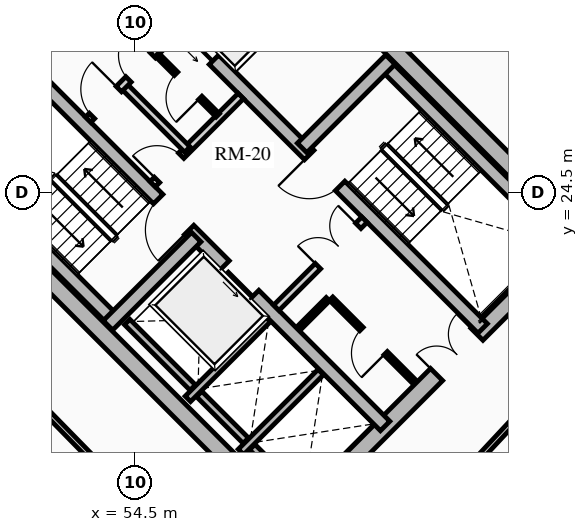
"""IFC4 building model, lengths in metres.
Left out: names, types, materials, properties, quantities, classifications, styles, units other than length and angle.
Written with IfcOpenShell. Run it as: python <this file> out.ifc"""

import sys

from ifc_helpers import new_model, si_unit, direction, frame, frame_2d, origin, place, context, subcontext, project, spatial, rectangle, extrude, source, transform, mapped, element, fill, save


model = new_model("IFC4")
c1 = context("Model", 3, precision=1e-05, world=origin(), true_north=direction((0.0, 1.0)))
c2 = subcontext(c1, "Body", "Model", "MODEL_VIEW")
j1 = project(units=[si_unit("LENGTHUNIT", "METRE"), si_unit("PLANEANGLEUNIT", "RADIAN")], contexts=[c1])
p1 = place(None, origin())
s1 = spatial("IfcSite", under=j1, at=p1, CompositionType="ELEMENT")
p2 = place(p1, origin())
s2 = spatial("IfcBuilding", under=s1, at=p2, CompositionType="ELEMENT")
p3 = place(p2, frame((0.0, 0.0, 87.61)))
s3 = spatial("IfcBuildingStorey", under=s2, at=p3, CompositionType="ELEMENT", Elevation=87.61)
for number, where, z_axis, x_axis in (
    (1, (58.737, 15.697, 0.0), (0.0, 0.0, 1.0), (-0.707, 0.707, 0.0)),
    (2, (66.303, 23.263, 0.0), (0.0, 0.0, 1.0), (-0.707, 0.707, 0.0)),
):
    element("IfcWall", number, at=place(p3, frame(where, z_axis=z_axis, x_axis=x_axis)), inside=s3, PredefinedType="SHEAR", context=c2, shape_type="SweptSolid", body=[
        extrude(rectangle(XDim=14.2, YDim=0.45, at=frame_2d((7.1, 0.0))), origin(), (0.0, 0.0, 1.0), 2.91),
    ])
p4 = place(p3, frame((58.578, 15.856, 0.0), z_axis=(0.0, 0.0, 1.0), x_axis=(0.707106781187, 0.707106781187, 0.0)))
e3 = element("IfcWall", 3, at=p4, inside=s3, PredefinedType="SHEAR", context=c2, shape_type="SweptSolid", body=[
    extrude(rectangle(XDim=10.7, YDim=0.45, at=frame_2d((5.35, 0.0))), origin(), (0.0, 0.0, 1.0), 2.91),
])
m1 = source(origin(), c2, "Body", "SweptSolid", [
    extrude(rectangle(XDim=1.5, YDim=2.02, at=frame_2d((0.75, 1.01))), frame((0.0, 0.235, 0.0), z_axis=(0.0, -1.0, 0.0), x_axis=(1.0, 0.0, 0.0)), (0.0, 0.0, 1.0), 0.47),
])
p5 = place(p4, frame((5.45, 0.0, 0.0)))
e4 = element("IfcOpeningElement", 4, at=p5, cuts=e3, PredefinedType="OPENING", context=c2, shape_type="MappedRepresentation", body=[
    mapped(m1, transform((0.0, 0.0, 0.0), x_axis=(1.0, 0.0, 0.0), y_axis=(0.0, 1.0, 0.0), z_axis=(0.0, 0.0, 1.0), scale=1.0)),
])
p6 = place(p3, frame((48.856, 25.578, 0.0), z_axis=(0.0, 0.0, 1.0), x_axis=(0.707106781187, 0.707106781187, 0.0)))
e5 = element("IfcWall", 5, at=p6, inside=s3, PredefinedType="SHEAR", context=c2, shape_type="SweptSolid", body=[
    extrude(rectangle(XDim=10.7, YDim=0.45, at=frame_2d((5.35, 0.0))), origin(), (0.0, 0.0, 1.0), 2.91),
])
p7 = place(p6, frame((4.6, 0.0, 0.0)))
e6 = element("IfcOpeningElement", 6, at=p7, cuts=e5, PredefinedType="OPENING", context=c2, shape_type="MappedRepresentation", body=[
    mapped(m1, transform((0.0, 0.0, 0.0), x_axis=(1.0, 0.0, 0.0), y_axis=(0.0, 1.0, 0.0), z_axis=(0.0, 0.0, 1.0), scale=1.0)),
])
p8 = place(p3, frame((61.078, 18.355, 0.0), z_axis=(0.0, 0.0, 1.0), x_axis=(-0.707106781187, 0.707106781187, 0.0)))
e7 = element("IfcWall", 7, at=p8, inside=s3, PredefinedType="SHEAR", context=c2, shape_type="SweptSolid", body=[
    extrude(rectangle(XDim=13.75, YDim=0.35, at=frame_2d((6.875, 0.0))), origin(), (0.0, 0.0, 1.0), 2.91),
])
m2 = source(origin(), c2, "Body", "SweptSolid", [
    extrude(rectangle(XDim=1.1, YDim=2.015, at=frame_2d((0.55, 1.007))), frame((0.0, 0.185, 0.0), z_axis=(0.0, -1.0, 0.0), x_axis=(1.0, 0.0, 0.0)), (0.0, 0.0, 1.0), 0.37),
])
p9 = place(p8, frame((4.875, 0.0, 0.0)))
e8 = element("IfcOpeningElement", 8, at=p9, cuts=e7, PredefinedType="OPENING", context=c2, shape_type="MappedRepresentation", body=[
    mapped(m2, transform((0.0, 0.0, 0.0), x_axis=(1.0, 0.0, 0.0), y_axis=(0.0, 1.0, 0.0), z_axis=(0.0, 0.0, 1.0), scale=1.0)),
])
m3 = source(origin(), c2, "Body", "SweptSolid", [
    extrude(rectangle(XDim=1.15, YDim=2.02, at=frame_2d((0.575, 1.01))), frame((0.0, 0.185, 0.0), z_axis=(0.0, -1.0, 0.0), x_axis=(1.0, 0.0, 0.0)), (0.0, 0.0, 1.0), 0.37),
])
p10 = place(p8, frame((7.295, 0.0, 0.0)))
e9 = element("IfcOpeningElement", 9, at=p10, cuts=e7, PredefinedType="OPENING", context=c2, shape_type="MappedRepresentation", body=[
    mapped(m3, transform((0.0, 0.0, 0.0), x_axis=(1.0, 0.0, 0.0), y_axis=(0.0, 1.0, 0.0), z_axis=(0.0, 0.0, 1.0), scale=1.0)),
])
p11 = place(p3, frame((63.645, 20.922, 0.0), z_axis=(0.0, 0.0, 1.0), x_axis=(-0.707106781187, 0.707106781187, 0.0)))
e10 = element("IfcWall", 10, at=p11, inside=s3, PredefinedType="SHEAR", context=c2, shape_type="SweptSolid", body=[
    extrude(rectangle(XDim=13.75, YDim=0.35, at=frame_2d((6.875, 0.0))), origin(), (0.0, 0.0, 1.0), 2.91),
])
p12 = place(p11, frame((10.0, 0.0, 0.0)))
e11 = element("IfcOpeningElement", 11, at=p12, cuts=e10, PredefinedType="OPENING", context=c2, shape_type="MappedRepresentation", body=[
    mapped(m2, transform((0.0, 0.0, 0.0), x_axis=(1.0, 0.0, 0.0), y_axis=(0.0, 1.0, 0.0), z_axis=(0.0, 0.0, 1.0), scale=1.0)),
])
p13 = place(p11, frame((12.0, 0.0, 0.0)))
e12 = element("IfcOpeningElement", 12, at=p13, cuts=e10, PredefinedType="OPENING", context=c2, shape_type="MappedRepresentation", body=[
    mapped(m2, transform((0.0, 0.0, 0.0), x_axis=(1.0, 0.0, 0.0), y_axis=(0.0, 1.0, 0.0), z_axis=(0.0, 0.0, 1.0), scale=1.0)),
])
p14 = place(p11, frame((5.305, 0.0, 0.0)))
e13 = element("IfcOpeningElement", 13, at=p14, cuts=e10, PredefinedType="OPENING", context=c2, shape_type="MappedRepresentation", body=[
    mapped(m3, transform((0.0, 0.0, 0.0), x_axis=(1.0, 0.0, 0.0), y_axis=(0.0, 1.0, 0.0), z_axis=(0.0, 0.0, 1.0), scale=1.0)),
])
p15 = place(p3, frame((53.922, 21.141, 0.0), z_axis=(0.0, 0.0, 1.0), x_axis=(-0.707088616009, 0.707124945897, 0.0)))
e14 = element("IfcWall", 14, at=p15, inside=s3, PredefinedType="SHEAR", context=c2, shape_type="SweptSolid", body=[
    extrude(rectangle(XDim=6.72, YDim=0.35, at=frame_2d((3.36, 0.0))), origin(), (0.0, 0.0, 1.0), 2.91),
])
p16 = place(p3, frame((53.784, 21.003, 0.0), z_axis=(0.0, 0.0, 1.0), x_axis=(0.707106781187, 0.707106781187, 0.0)))
e15 = element("IfcWall", 15, at=p16, inside=s3, PredefinedType="SHEAR", context=c2, shape_type="SweptSolid", body=[
    extrude(rectangle(XDim=3.285, YDim=0.35, at=frame_2d((1.643, 0.0))), origin(), (0.0, 0.0, 1.0), 2.91),
])
p17 = place(p3, frame((65.83, 23.107, 0.0), z_axis=(0.0, 0.0, 1.0), x_axis=(-0.707088616009, 0.707124945897, 0.0)))
e16 = element("IfcWall", 16, at=p17, inside=s3, PredefinedType="SHEAR", context=c2, shape_type="SweptSolid", body=[
    extrude(rectangle(XDim=6.72, YDim=0.35, at=frame_2d((3.36, 0.0))), origin(), (0.0, 0.0, 1.0), 2.91),
])
p18 = place(p3, frame((58.893, 25.674, 0.0), z_axis=(0.0, 0.0, 1.0), x_axis=(0.707106781187, 0.707106781187, 0.0)))
e17 = element("IfcWall", 17, at=p18, inside=s3, PredefinedType="SHEAR", context=c2, shape_type="SweptSolid", body=[
    extrude(rectangle(XDim=3.285, YDim=0.35, at=frame_2d((1.643, 0.0))), origin(), (0.0, 0.0, 1.0), 2.91),
])
p19 = place(p3, frame((55.888, 19.069, 0.0), z_axis=(0.0, 0.0, 1.0), x_axis=(0.707106781187, 0.707106781187, 0.0)))
e18 = element("IfcWall", 18, at=p19, inside=s3, PredefinedType="SHEAR", context=c2, shape_type="SweptSolid", body=[
    extrude(rectangle(XDim=2.97, YDim=0.2, at=frame_2d((1.485, 0.0))), origin(), (0.0, 0.0, 1.0), 2.91),
])
p20 = place(p3, frame((56.015, 19.366, 0.0), z_axis=(0.0, 0.0, 1.0), x_axis=(-0.707106781187, 0.707106781187, 0.0)))
e19 = element("IfcWall", 19, at=p20, inside=s3, PredefinedType="SHEAR", context=c2, shape_type="SweptSolid", body=[
    extrude(rectangle(XDim=2.44, YDim=0.2, at=frame_2d((1.22, 0.0))), origin(), (0.0, 0.0, 1.0), 2.91),
])
p21 = place(p3, frame((57.284, 17.673, 0.0), z_axis=(0.0, 0.0, 1.0), x_axis=(0.707147878904, 0.70706568108, 0.0)))
e20 = element("IfcWall", 20, at=p21, inside=s3, PredefinedType="SHEAR", context=c2, shape_type="SweptSolid", body=[
    extrude(rectangle(XDim=2.97, YDim=0.2, at=frame_2d((1.485, 0.0))), origin(), (0.0, 0.0, 1.0), 2.91),
])
p22 = place(p3, frame((57.412, 17.97, 0.0), z_axis=(0.0, 0.0, 1.0), x_axis=(-0.707106781187, 0.707106781187, 0.0)))
e21 = element("IfcWall", 21, at=p22, inside=s3, PredefinedType="SHEAR", context=c2, shape_type="SweptSolid", body=[
    extrude(rectangle(XDim=1.735, YDim=0.2, at=frame_2d((0.867, 0.0))), origin(), (0.0, 0.0, 1.0), 2.91),
])
p23 = place(p3, frame((58.737, 16.644, 0.0), z_axis=(0.0, 0.0, 1.0), x_axis=(-0.707032117043, 0.707181437447, 0.0)))
e22 = element("IfcWall", 22, at=p23, inside=s3, PredefinedType="SHEAR", context=c2, shape_type="SweptSolid", body=[
    extrude(rectangle(XDim=1.635, YDim=0.2, at=frame_2d((0.817, 0.0))), origin(), (0.0, 0.0, 1.0), 2.91),
])
p24 = place(p3, frame((57.062, 27.781, 0.0), z_axis=(0.0, 0.0, 1.0), x_axis=(0.707106781187, 0.707106781187, 0.0)))
e23 = element("IfcWall", 23, at=p24, inside=s3, PredefinedType="SHEAR", context=c2, shape_type="SweptSolid", body=[
    extrude(rectangle(XDim=2.97, YDim=0.2, at=frame_2d((1.485, 0.0))), origin(), (0.0, 0.0, 1.0), 2.91),
])
p25 = place(p3, frame((58.214, 21.467, 0.0), z_axis=(0.0, 0.0, 1.0), x_axis=(0.707106781187, 0.707106781187, 0.0)))
e24 = element("IfcWall", 24, at=p25, inside=s3, PredefinedType="PARTITIONING", context=c2, shape_type="SweptSolid", body=[
    extrude(rectangle(XDim=3.28, YDim=0.2, at=frame_2d((1.64, 0.0))), origin(), (0.0, 0.0, 1.0), 2.655),
])
m4 = source(origin(), c2, "Body", "SweptSolid", [
    extrude(rectangle(XDim=1.5, YDim=2.02, at=frame_2d((0.75, 1.01))), frame((0.0, 0.11, 0.0), z_axis=(0.0, -1.0, 0.0), x_axis=(1.0, 0.0, 0.0)), (0.0, 0.0, 1.0), 0.22),
])
p26 = place(p25, frame((1.55, 0.0, 0.0)))
e25 = element("IfcOpeningElement", 25, at=p26, cuts=e24, PredefinedType="OPENING", context=c2, shape_type="MappedRepresentation", body=[
    mapped(m4, transform((0.0, 0.0, 0.0), x_axis=(1.0, 0.0, 0.0), y_axis=(0.0, 1.0, 0.0), z_axis=(0.0, 0.0, 1.0), scale=1.0)),
])
p27 = place(p3, frame((54.961, 24.719, 0.0), z_axis=(0.0, 0.0, 1.0), x_axis=(0.707106781187, 0.707106781187, 0.0)))
e26 = element("IfcWall", 26, at=p27, inside=s3, PredefinedType="PARTITIONING", context=c2, shape_type="SweptSolid", body=[
    extrude(rectangle(XDim=3.28, YDim=0.2, at=frame_2d((1.64, 0.0))), origin(), (0.0, 0.0, 1.0), 2.655),
])
m5 = source(origin(), c2, "Body", "SweptSolid", [
    extrude(rectangle(XDim=0.9, YDim=2.005, at=frame_2d((0.45, 1.002))), frame((0.0, 0.11, 0.0), z_axis=(0.0, -1.0, 0.0), x_axis=(1.0, 0.0, 0.0)), (0.0, 0.0, 1.0), 0.22),
])
p28 = place(p27, frame((0.16, 0.0, 0.0)))
e27 = element("IfcOpeningElement", 27, at=p28, cuts=e26, PredefinedType="OPENING", context=c2, shape_type="MappedRepresentation", body=[
    mapped(m5, transform((0.0, 0.0, 0.0), x_axis=(1.0, 0.0, 0.0), y_axis=(0.0, 1.0, 0.0), z_axis=(0.0, 0.0, 1.0), scale=1.0)),
])
p29 = place(p3, frame((55.874, 25.631, 0.0), z_axis=(0.0, 0.0, 1.0), x_axis=(-0.707157639372, 0.707055919343, 0.0)))
e28 = element("IfcWall", 28, at=p29, inside=s3, PredefinedType="PARTITIONING", context=c2, shape_type="SweptSolid", body=[
    extrude(rectangle(XDim=2.4, YDim=0.2, at=frame_2d((1.2, 0.0))), origin(), (0.0, 0.0, 1.0), 2.655),
])
p30 = place(p3, frame((53.264, 26.416, 0.0), z_axis=(0.0, 0.0, 1.0), x_axis=(0.707106781187, 0.707106781187, 0.0)))
e29 = element("IfcWall", 29, at=p30, inside=s3, PredefinedType="PARTITIONING", context=c2, shape_type="SweptSolid", body=[
    extrude(rectangle(XDim=3.28, YDim=0.2, at=frame_2d((1.64, 0.0))), origin(), (0.0, 0.0, 1.0), 2.655),
])
m6 = source(origin(), c2, "Body", "SweptSolid", [
    extrude(rectangle(XDim=1.0, YDim=2.015, at=frame_2d((0.5, 1.007))), frame((0.0, 0.11, 0.0), z_axis=(0.0, -1.0, 0.0), x_axis=(1.0, 0.0, 0.0)), (0.0, 0.0, 1.0), 0.22),
])
p31 = place(p30, frame((0.14, 0.0, 0.0)))
e30 = element("IfcOpeningElement", 30, at=p31, cuts=e29, PredefinedType="OPENING", context=c2, shape_type="MappedRepresentation", body=[
    mapped(m6, transform((0.0, 0.0, 0.0), x_axis=(1.0, 0.0, 0.0), y_axis=(0.0, 1.0, 0.0), z_axis=(0.0, 0.0, 1.0), scale=1.0)),
])
p32 = place(p30, frame((1.5, 0.0, 0.0)))
e31 = element("IfcOpeningElement", 31, at=p32, cuts=e29, PredefinedType="OPENING", context=c2, shape_type="MappedRepresentation", body=[
    mapped(m5, transform((0.0, 0.0, 0.0), x_axis=(1.0, 0.0, 0.0), y_axis=(0.0, 1.0, 0.0), z_axis=(0.0, 0.0, 1.0), scale=1.0)),
])
p33 = place(p3, frame((61.835, 19.529, 0.0), z_axis=(0.0, 0.0, 1.0), x_axis=(-0.707146413884, 0.707067146267, 0.0)))
e32 = element("IfcWall", 32, at=p33, inside=s3, PredefinedType="PARTITIONING", context=c2, shape_type="SweptSolid", body=[
    extrude(rectangle(XDim=3.08, YDim=0.125, at=frame_2d((1.54, 0.0))), origin(), (0.0, 0.0, 1.0), 2.655),
])
m7 = source(origin(), c2, "Body", "SweptSolid", [
    extrude(rectangle(XDim=0.9, YDim=2.005, at=frame_2d((0.45, 1.002))), frame((0.0, 0.073, 0.0), z_axis=(0.0, -1.0, 0.0), x_axis=(1.0, 0.0, 0.0)), (0.0, 0.0, 1.0), 0.145),
])
p34 = place(p33, frame((1.05, 0.0, 0.0)))
e33 = element("IfcOpeningElement", 33, at=p34, cuts=e32, PredefinedType="OPENING", context=c2, shape_type="MappedRepresentation", body=[
    mapped(m7, transform((0.0, 0.0, 0.0), x_axis=(1.0, 0.0, 0.0), y_axis=(0.0, 1.0, 0.0), z_axis=(0.0, 0.0, 1.0), scale=1.0)),
])
p35 = place(p3, frame((58.794, 20.915, 0.0), z_axis=(0.0, 0.0, 1.0), x_axis=(0.707106781187, 0.707106781187, 0.0)))
e34 = element("IfcWall", 34, at=p35, inside=s3, PredefinedType="PARTITIONING", context=c2, shape_type="SweptSolid", body=[
    extrude(rectangle(XDim=1.1, YDim=0.125, at=frame_2d((0.55, 0.0))), origin(), (0.0, 0.0, 1.0), 2.655),
])
p36 = place(p3, frame((56.673, 26.529, 0.0), z_axis=(0.0, 0.0, 1.0), x_axis=(-0.707052764397, 0.70716079385, 0.0)))
e35 = element("IfcWall", 35, at=p36, inside=s3, PredefinedType="PARTITIONING", context=c2, shape_type="SweptSolid", body=[
    extrude(rectangle(XDim=2.26, YDim=0.125, at=frame_2d((1.13, 0.0))), origin(), (0.0, 0.0, 1.0), 2.655),
])
p37 = place(p36, frame((0.65, 0.0, 0.0)))
e36 = element("IfcOpeningElement", 36, at=p37, cuts=e35, PredefinedType="OPENING", context=c2, shape_type="MappedRepresentation", body=[
    mapped(m7, transform((0.0, 0.0, 0.0), x_axis=(1.0, 0.0, 0.0), y_axis=(0.0, 1.0, 0.0), z_axis=(0.0, 0.0, 1.0), scale=1.0)),
])
p38 = place(p3, frame((51.949, 18.949, 0.0), z_axis=(0.0, 0.0, 1.0), x_axis=(0.699801520154, -0.714337337951, 0.0)))
e37 = element("IfcWall", 37, at=p38, inside=s3, PredefinedType="PARTITIONING", context=c2, shape_type="SweptSolid", body=[
    extrude(rectangle(XDim=6.097, YDim=0.15, at=frame_2d((3.048, 0.0))), origin(), (0.0, 0.0, 1.0), 2.225),
])
p39 = place(p3, frame((62.839, 16.745, 0.0), z_axis=(0.0, 0.0, 1.0), x_axis=(0.682386779427, 0.73099130177, 0.0)))
e38 = element("IfcWall", 38, at=p39, inside=s3, PredefinedType="PARTITIONING", context=c2, shape_type="SweptSolid", body=[
    extrude(rectangle(XDim=6.6, YDim=0.15, at=frame_2d((3.3, 0.0))), origin(), (0.0, 0.0, 1.0), 2.225),
])
p40 = place(p3, frame((67.19, 25.791, 0.0), z_axis=(0.0, 0.0, 1.0), x_axis=(-0.696839457851, 0.717227139742, 0.0)))
e39 = element("IfcWall", 39, at=p40, inside=s3, PredefinedType="PARTITIONING", context=c2, shape_type="SweptSolid", body=[
    extrude(rectangle(XDim=5.939, YDim=0.15, at=frame_2d((2.97, 0.0))), origin(), (0.0, 0.0, 1.0), 2.655),
])
m8 = source(origin(), c2, "Body", "SweptSolid", [
    extrude(rectangle(XDim=1.1, YDim=2.015, at=frame_2d((0.55, 1.007))), frame((0.0, 0.025, 0.0), z_axis=(0.0, -1.0, 0.0), x_axis=(1.0, 0.0, 0.0)), (0.0, 0.0, 1.0), 0.05),
])
p41 = place(p9, origin())
e40 = element("IfcDoor", 40, at=p41, inside=s3, OperationType="SLIDING_TO_LEFT", PredefinedType="DOOR", context=c2, shape_type="MappedRepresentation", body=[
    mapped(m8, transform((0.0, 0.0, 0.0), x_axis=(1.0, 0.0, 0.0), y_axis=(0.0, 1.0, 0.0), z_axis=(0.0, 0.0, 1.0), scale=1.0)),
])
fill(e8, e40)
p42 = place(p12, origin())
e41 = element("IfcDoor", 41, at=p42, inside=s3, OperationType="SLIDING_TO_LEFT", PredefinedType="DOOR", context=c2, shape_type="MappedRepresentation", body=[
    mapped(m8, transform((0.0, 0.0, 0.0), x_axis=(1.0, 0.0, 0.0), y_axis=(0.0, 1.0, 0.0), z_axis=(0.0, 0.0, 1.0), scale=1.0)),
])
fill(e11, e41)
m9 = source(origin(), c2, "Body", "SweptSolid", [
    extrude(rectangle(XDim=1.15, YDim=2.02, at=frame_2d((0.575, 1.01))), frame((0.0, 0.025, 0.0), z_axis=(0.0, -1.0, 0.0), x_axis=(1.0, 0.0, 0.0)), (0.0, 0.0, 1.0), 0.05),
])
p43 = place(p10, origin())
e42 = element("IfcDoor", 42, at=p43, inside=s3, OperationType="SINGLE_SWING_LEFT", PredefinedType="DOOR", context=c2, shape_type="MappedRepresentation", body=[
    mapped(m9, transform((0.0, 0.0, 0.0), x_axis=(1.0, 0.0, 0.0), y_axis=(0.0, 1.0, 0.0), z_axis=(0.0, 0.0, 1.0), scale=1.0)),
])
fill(e9, e42)
p44 = place(p14, origin())
e43 = element("IfcDoor", 43, at=p44, inside=s3, OperationType="SINGLE_SWING_RIGHT", PredefinedType="DOOR", context=c2, shape_type="MappedRepresentation", body=[
    mapped(m9, transform((0.0, 0.0, 0.0), x_axis=(1.0, 0.0, 0.0), y_axis=(0.0, 1.0, 0.0), z_axis=(0.0, 0.0, 1.0), scale=1.0)),
])
fill(e13, e43)
m10 = source(origin(), c2, "Body", "SweptSolid", [
    extrude(rectangle(XDim=1.5, YDim=2.02, at=frame_2d((0.75, 1.01))), frame((0.0, 0.025, 0.0), z_axis=(0.0, -1.0, 0.0), x_axis=(1.0, 0.0, 0.0)), (0.0, 0.0, 1.0), 0.05),
])
p45 = place(p5, origin())
e44 = element("IfcDoor", 44, at=p45, inside=s3, OperationType="DOUBLE_DOOR_SINGLE_SWING", PredefinedType="DOOR", context=c2, shape_type="MappedRepresentation", body=[
    mapped(m10, transform((0.0, 0.0, 0.0), x_axis=(1.0, 0.0, 0.0), y_axis=(0.0, 1.0, 0.0), z_axis=(0.0, 0.0, 1.0), scale=1.0)),
])
fill(e4, e44)
p46 = place(p26, origin())
e45 = element("IfcDoor", 45, at=p46, inside=s3, OperationType="DOUBLE_DOOR_SINGLE_SWING", PredefinedType="DOOR", context=c2, shape_type="MappedRepresentation", body=[
    mapped(m10, transform((0.0, 0.0, 0.0), x_axis=(1.0, 0.0, 0.0), y_axis=(0.0, 1.0, 0.0), z_axis=(0.0, 0.0, 1.0), scale=1.0)),
])
fill(e25, e45)
m11 = source(origin(), c2, "Body", "SweptSolid", [
    extrude(rectangle(XDim=0.9, YDim=2.005, at=frame_2d((0.45, 1.002))), frame((0.0, 0.025, 0.0), z_axis=(0.0, -1.0, 0.0), x_axis=(1.0, 0.0, 0.0)), (0.0, 0.0, 1.0), 0.05),
])
p47 = place(p28, origin())
e46 = element("IfcDoor", 46, at=p47, inside=s3, OperationType="SINGLE_SWING_LEFT", PredefinedType="DOOR", context=c2, shape_type="MappedRepresentation", body=[
    mapped(m11, transform((0.0, 0.0, 0.0), x_axis=(1.0, 0.0, 0.0), y_axis=(0.0, 1.0, 0.0), z_axis=(0.0, 0.0, 1.0), scale=1.0)),
])
fill(e27, e46)
m12 = source(origin(), c2, "Body", "SweptSolid", [
    extrude(rectangle(XDim=1.0, YDim=2.015, at=frame_2d((0.5, 1.007))), frame((0.0, 0.025, 0.0), z_axis=(0.0, -1.0, 0.0), x_axis=(1.0, 0.0, 0.0)), (0.0, 0.0, 1.0), 0.05),
])
p48 = place(p31, origin())
e47 = element("IfcDoor", 47, at=p48, inside=s3, OperationType="SINGLE_SWING_RIGHT", PredefinedType="DOOR", context=c2, shape_type="MappedRepresentation", body=[
    mapped(m12, transform((0.0, 0.0, 0.0), x_axis=(1.0, 0.0, 0.0), y_axis=(0.0, 1.0, 0.0), z_axis=(0.0, 0.0, 1.0), scale=1.0)),
])
fill(e30, e47)
p49 = place(p34, origin())
e48 = element("IfcDoor", 48, at=p49, inside=s3, OperationType="SINGLE_SWING_LEFT", PredefinedType="DOOR", context=c2, shape_type="MappedRepresentation", body=[
    mapped(m11, transform((0.0, 0.0, 0.0), x_axis=(1.0, 0.0, 0.0), y_axis=(0.0, 1.0, 0.0), z_axis=(0.0, 0.0, 1.0), scale=1.0)),
])
fill(e33, e48)
p50 = place(p32, origin())
e49 = element("IfcDoor", 49, at=p50, inside=s3, OperationType="SINGLE_SWING_RIGHT", PredefinedType="DOOR", context=c2, shape_type="MappedRepresentation", body=[
    mapped(m11, transform((0.0, 0.0, 0.0), x_axis=(1.0, 0.0, 0.0), y_axis=(0.0, 1.0, 0.0), z_axis=(0.0, 0.0, 1.0), scale=1.0)),
])
fill(e31, e49)
p51 = place(p37, origin())
e50 = element("IfcDoor", 50, at=p51, inside=s3, OperationType="SINGLE_SWING_LEFT", PredefinedType="DOOR", context=c2, shape_type="MappedRepresentation", body=[
    mapped(m11, transform((0.0, 0.0, 0.0), x_axis=(1.0, 0.0, 0.0), y_axis=(0.0, 1.0, 0.0), z_axis=(0.0, 0.0, 1.0), scale=1.0)),
])
fill(e36, e50)
save(model, sys.argv[1])
